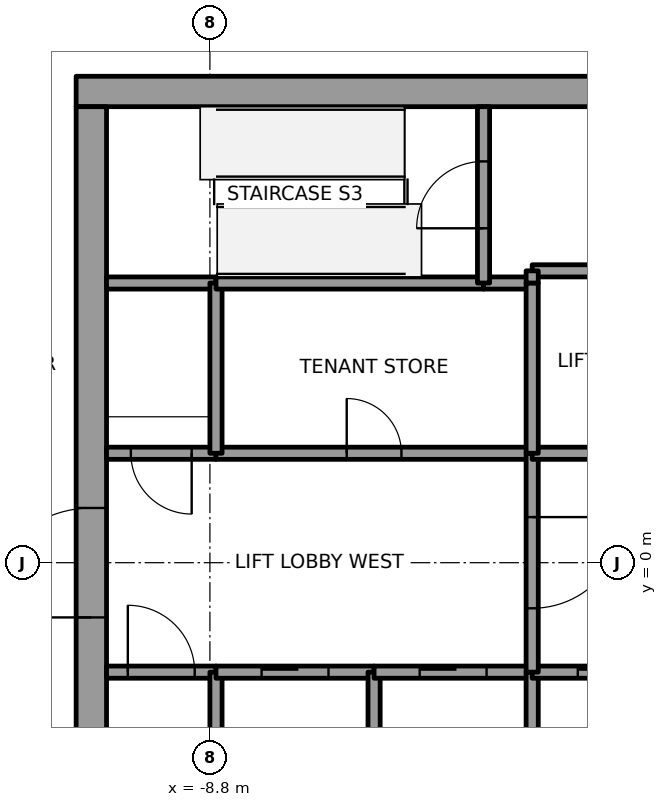
"""IFC4 building model, lengths in metres.
Left out: names, types, materials, properties, quantities, classifications, styles, units other than length and angle.
Written with IfcOpenShell. Run it as: python <this file> out.ifc"""

import sys

from ifc_helpers import new_model, si_unit, direction, frame, frame_2d, origin, place, context, subcontext, project, spatial, rectangle, extrude, element, fill, save


model = new_model("IFC4")
c1 = context("Model", 3, precision=1e-05, world=origin(), true_north=direction((0.0, 1.0)))
c2 = subcontext(c1, "Body", "Model", "MODEL_VIEW")
j1 = project(units=[si_unit("LENGTHUNIT", "METRE"), si_unit("PLANEANGLEUNIT", "RADIAN")], contexts=[c1])
p1 = place(None, origin())
s1 = spatial("IfcSite", under=j1, at=p1, CompositionType="ELEMENT")
p2 = place(p1, origin())
s2 = spatial("IfcBuilding", under=s1, at=p2, CompositionType="ELEMENT")
p3 = place(p2, frame((0.0, 0.0, 267.0)))
s3 = spatial("IfcBuildingStorey", under=s2, at=p3, CompositionType="ELEMENT", Elevation=267.0)
p4 = place(p3, frame((-11.0, 7.75, 0.0), z_axis=(0.0, 0.0, 1.0), x_axis=(1.0, 0.0, 0.0)))
e1 = element("IfcWall", 1, at=p4, inside=s3, PredefinedType="SHEAR", context=c2, shape_type="SweptSolid", body=[
    extrude(rectangle(XDim=22.0, YDim=0.5, at=frame_2d((11.0, 0.0))), origin(), (0.0, 0.0, 1.0), 4.0),
])
p5 = place(p4, frame((10.45, 0.0, 0.0)))
e2 = element("IfcOpeningElement", 2, at=p5, cuts=e1, PredefinedType="OPENING", context=c2, shape_type="SweptSolid", body=[
    extrude(rectangle(XDim=1.1, YDim=2.1, at=frame_2d((0.55, 1.05))), frame((0.0, 0.25, 0.0), z_axis=(0.0, -1.0, 0.0), x_axis=(1.0, 0.0, 0.0)), (0.0, 0.0, 1.0), 0.5),
])
p6 = place(p3, frame((-10.75, -7.5, 0.0), z_axis=(0.0, 0.0, 1.0), x_axis=(0.0, 1.0, 0.0)))
e3 = element("IfcWall", 3, at=p6, inside=s3, PredefinedType="SHEAR", context=c2, shape_type="SweptSolid", body=[
    extrude(rectangle(XDim=15.0, YDim=0.5, at=frame_2d((7.5, 0.0))), origin(), (0.0, 0.0, 1.0), 4.0),
])
p7 = place(p6, frame((6.6, 0.0, 0.0)))
e4 = element("IfcOpeningElement", 4, at=p7, cuts=e3, PredefinedType="OPENING", context=c2, shape_type="SweptSolid", body=[
    extrude(rectangle(XDim=1.8, YDim=2.1, at=frame_2d((0.9, 1.05))), frame((0.0, 0.25, 0.0), z_axis=(0.0, -1.0, 0.0), x_axis=(1.0, 0.0, 0.0)), (0.0, 0.0, 1.0), 0.5),
])
p8 = place(p3, frame((-10.5, -1.8, 0.0), z_axis=(0.0, 0.0, 1.0), x_axis=(1.0, 0.0, 0.0)))
e5 = element("IfcWall", 5, at=p8, inside=s3, PredefinedType="SOLIDWALL", context=c2, shape_type="SweptSolid", body=[
    extrude(rectangle(XDim=1.8, YDim=0.2, at=frame_2d((0.9, 0.0))), origin(), (0.0, 0.0, 1.0), 3.85),
])
p9 = place(p8, frame((0.35, 0.0, 0.0)))
e6 = element("IfcOpeningElement", 6, at=p9, cuts=e5, PredefinedType="OPENING", context=c2, shape_type="SweptSolid", body=[
    extrude(rectangle(XDim=1.1, YDim=2.1, at=frame_2d((0.55, 1.05))), frame((0.0, 0.1, 0.0), z_axis=(0.0, -1.0, 0.0), x_axis=(1.0, 0.0, 0.0)), (0.0, 0.0, 1.0), 0.2),
])
p10 = place(p3, frame((-8.7, 1.8, 0.0), z_axis=(0.0, 0.0, 1.0), x_axis=(-1.0, 0.0, 0.0)))
e7 = element("IfcWall", 7, at=p10, inside=s3, PredefinedType="SOLIDWALL", context=c2, shape_type="SweptSolid", body=[
    extrude(rectangle(XDim=1.8, YDim=0.2, at=frame_2d((0.9, 0.0))), origin(), (0.0, 0.0, 1.0), 3.85),
])
p11 = place(p10, frame((0.4, 0.0, 0.0)))
e8 = element("IfcOpeningElement", 8, at=p11, cuts=e7, PredefinedType="OPENING", context=c2, shape_type="SweptSolid", body=[
    extrude(rectangle(XDim=1.0, YDim=2.1, at=frame_2d((0.5, 1.05))), frame((0.0, 0.1, 0.0), z_axis=(0.0, -1.0, 0.0), x_axis=(1.0, 0.0, 0.0)), (0.0, 0.0, 1.0), 0.2),
])
p12 = place(p3, frame((-8.7, 4.6, 0.0), z_axis=(0.0, 0.0, 1.0), x_axis=(-1.0, 0.0, 0.0)))
e9 = element("IfcWall", 9, at=p12, inside=s3, PredefinedType="SOLIDWALL", context=c2, shape_type="SweptSolid", body=[
    extrude(rectangle(XDim=1.8, YDim=0.2, at=frame_2d((0.9, 0.0))), origin(), (0.0, 0.0, 1.0), 3.85),
])
p13 = place(p3, frame((-8.7, -4.6, 0.0), z_axis=(0.0, 0.0, 1.0), x_axis=(0.0, 1.0, 0.0)))
e10 = element("IfcWall", 10, at=p13, inside=s3, PredefinedType="SOLIDWALL", context=c2, shape_type="SweptSolid", body=[
    extrude(rectangle(XDim=2.8, YDim=0.2, at=frame_2d((1.4, 0.0))), origin(), (0.0, 0.0, 1.0), 3.85),
])
p14 = place(p3, frame((-8.7, -1.8, 0.0), z_axis=(0.0, 0.0, 1.0), x_axis=(1.0, 0.0, 0.0)))
e11 = element("IfcWall", 11, at=p14, inside=s3, PredefinedType="SOLIDWALL", context=c2, shape_type="SweptSolid", body=[
    extrude(rectangle(XDim=2.6, YDim=0.2, at=frame_2d((1.3, 0.0))), origin(), (0.0, 0.0, 1.0), 3.85),
])
p15 = place(p14, frame((0.75, 0.0, 0.0)))
e12 = element("IfcOpeningElement", 12, at=p15, cuts=e11, PredefinedType="OPENING", context=c2, shape_type="SweptSolid", body=[
    extrude(rectangle(XDim=1.1, YDim=2.1, at=frame_2d((0.55, 1.05))), frame((0.0, 0.1, 0.0), z_axis=(0.0, -1.0, 0.0), x_axis=(1.0, 0.0, 0.0)), (0.0, 0.0, 1.0), 0.2),
])
p16 = place(p3, frame((-8.7, 1.8, 0.0), z_axis=(0.0, 0.0, 1.0), x_axis=(1.0, 0.0, 0.0)))
e13 = element("IfcWall", 13, at=p16, inside=s3, PredefinedType="SOLIDWALL", context=c2, shape_type="SweptSolid", body=[
    extrude(rectangle(XDim=5.2, YDim=0.2, at=frame_2d((2.6, 0.0))), origin(), (0.0, 0.0, 1.0), 3.85),
])
p17 = place(p16, frame((2.15, 0.0, 0.0)))
e14 = element("IfcOpeningElement", 14, at=p17, cuts=e13, PredefinedType="OPENING", context=c2, shape_type="SweptSolid", body=[
    extrude(rectangle(XDim=0.9, YDim=2.1, at=frame_2d((0.45, 1.05))), frame((0.0, 0.1, 0.0), z_axis=(0.0, -1.0, 0.0), x_axis=(1.0, 0.0, 0.0)), (0.0, 0.0, 1.0), 0.2),
])
p18 = place(p3, frame((-8.7, 4.6, 0.0), z_axis=(0.0, 0.0, 1.0), x_axis=(0.0, -1.0, 0.0)))
e15 = element("IfcWall", 15, at=p18, inside=s3, PredefinedType="SOLIDWALL", context=c2, shape_type="SweptSolid", body=[
    extrude(rectangle(XDim=2.8, YDim=0.2, at=frame_2d((1.4, 0.0))), origin(), (0.0, 0.0, 1.0), 3.85),
])
p19 = place(p3, frame((-4.3, 4.6, 0.0), z_axis=(0.0, 0.0, 1.0), x_axis=(-1.0, 0.0, 0.0)))
e16 = element("IfcWall", 16, at=p19, inside=s3, PredefinedType="SOLIDWALL", context=c2, shape_type="SweptSolid", body=[
    extrude(rectangle(XDim=4.4, YDim=0.2, at=frame_2d((2.2, 0.0))), origin(), (0.0, 0.0, 1.0), 3.85),
])
p20 = place(p3, frame((-6.1, -4.6, 0.0), z_axis=(0.0, 0.0, 1.0), x_axis=(0.0, 1.0, 0.0)))
e17 = element("IfcWall", 17, at=p20, inside=s3, PredefinedType="SOLIDWALL", context=c2, shape_type="SweptSolid", body=[
    extrude(rectangle(XDim=2.8, YDim=0.2, at=frame_2d((1.4, 0.0))), origin(), (0.0, 0.0, 1.0), 3.85),
])
p21 = place(p3, frame((-6.1, -1.8, 0.0), z_axis=(0.0, 0.0, 1.0), x_axis=(1.0, 0.0, 0.0)))
e18 = element("IfcWall", 18, at=p21, inside=s3, PredefinedType="SOLIDWALL", context=c2, shape_type="SweptSolid", body=[
    extrude(rectangle(XDim=2.6, YDim=0.2, at=frame_2d((1.3, 0.0))), origin(), (0.0, 0.0, 1.0), 3.85),
])
p22 = place(p21, frame((0.75, 0.0, 0.0)))
e19 = element("IfcOpeningElement", 19, at=p22, cuts=e18, PredefinedType="OPENING", context=c2, shape_type="SweptSolid", body=[
    extrude(rectangle(XDim=1.1, YDim=2.1, at=frame_2d((0.55, 1.05))), frame((0.0, 0.1, 0.0), z_axis=(0.0, -1.0, 0.0), x_axis=(1.0, 0.0, 0.0)), (0.0, 0.0, 1.0), 0.2),
])
p23 = place(p3, frame((-3.5, 4.6, 0.0), z_axis=(0.0, 0.0, 1.0), x_axis=(-1.0, 0.0, 0.0)))
e20 = element("IfcWall", 20, at=p23, inside=s3, PredefinedType="SOLIDWALL", context=c2, shape_type="SweptSolid", body=[
    extrude(rectangle(XDim=0.8, YDim=0.2, at=frame_2d((0.4, 0.0))), origin(), (0.0, 0.0, 1.0), 3.85),
])
p24 = place(p3, frame((-4.3, 4.6, 0.0), z_axis=(0.0, 0.0, 1.0), x_axis=(0.0, 1.0, 0.0)))
e21 = element("IfcWall", 21, at=p24, inside=s3, PredefinedType="SOLIDWALL", context=c2, shape_type="SweptSolid", body=[
    extrude(rectangle(XDim=2.9, YDim=0.2, at=frame_2d((1.45, 0.0))), origin(), (0.0, 0.0, 1.0), 3.85),
])
p25 = place(p24, frame((0.9, 0.0, 0.0)))
e22 = element("IfcOpeningElement", 22, at=p25, cuts=e21, PredefinedType="OPENING", context=c2, shape_type="SweptSolid", body=[
    extrude(rectangle(XDim=1.1, YDim=2.1, at=frame_2d((0.55, 1.05))), frame((0.0, 0.1, 0.0), z_axis=(0.0, -1.0, 0.0), x_axis=(1.0, 0.0, 0.0)), (0.0, 0.0, 1.0), 0.2),
])
p26 = place(p3, frame((-3.5, -4.6, 0.0), z_axis=(0.0, 0.0, 1.0), x_axis=(0.0, 1.0, 0.0)))
e23 = element("IfcWall", 23, at=p26, inside=s3, PredefinedType="SOLIDWALL", context=c2, shape_type="SweptSolid", body=[
    extrude(rectangle(XDim=2.8, YDim=0.2, at=frame_2d((1.4, 0.0))), origin(), (0.0, 0.0, 1.0), 3.85),
])
p27 = place(p3, frame((-3.5, -1.8, 0.0), z_axis=(0.0, 0.0, 1.0), x_axis=(1.0, 0.0, 0.0)))
e24 = element("IfcWall", 24, at=p27, inside=s3, PredefinedType="SOLIDWALL", context=c2, shape_type="SweptSolid", body=[
    extrude(rectangle(XDim=2.6, YDim=0.2, at=frame_2d((1.3, 0.0))), origin(), (0.0, 0.0, 1.0), 3.85),
])
p28 = place(p27, frame((0.75, 0.0, 0.0)))
e25 = element("IfcOpeningElement", 25, at=p28, cuts=e24, PredefinedType="OPENING", context=c2, shape_type="SweptSolid", body=[
    extrude(rectangle(XDim=1.1, YDim=2.1, at=frame_2d((0.55, 1.05))), frame((0.0, 0.1, 0.0), z_axis=(0.0, -1.0, 0.0), x_axis=(1.0, 0.0, 0.0)), (0.0, 0.0, 1.0), 0.2),
])
p29 = place(p3, frame((-3.5, 1.8, 0.0), z_axis=(0.0, 0.0, 1.0), x_axis=(0.0, -1.0, 0.0)))
e26 = element("IfcWall", 26, at=p29, inside=s3, PredefinedType="SOLIDWALL", context=c2, shape_type="SweptSolid", body=[
    extrude(rectangle(XDim=3.6, YDim=0.2, at=frame_2d((1.8, 0.0))), origin(), (0.0, 0.0, 1.0), 3.85),
])
p30 = place(p29, frame((1.05, 0.0, 0.0)))
e27 = element("IfcOpeningElement", 27, at=p30, cuts=e26, PredefinedType="OPENING", context=c2, shape_type="SweptSolid", body=[
    extrude(rectangle(XDim=1.5, YDim=2.1, at=frame_2d((0.75, 1.05))), frame((0.0, 0.1, 0.0), z_axis=(0.0, -1.0, 0.0), x_axis=(1.0, 0.0, 0.0)), (0.0, 0.0, 1.0), 0.2),
])
p31 = place(p3, frame((-0.9, 1.8, 0.0), z_axis=(0.0, 0.0, 1.0), x_axis=(-1.0, 0.0, 0.0)))
e28 = element("IfcWall", 28, at=p31, inside=s3, PredefinedType="SOLIDWALL", context=c2, shape_type="SweptSolid", body=[
    extrude(rectangle(XDim=2.6, YDim=0.2, at=frame_2d((1.3, 0.0))), origin(), (0.0, 0.0, 1.0), 3.85),
])
p32 = place(p3, frame((-3.5, 1.8, 0.0), z_axis=(0.0, 0.0, 1.0), x_axis=(0.0, 1.0, 0.0)))
e29 = element("IfcWall", 29, at=p32, inside=s3, PredefinedType="SOLIDWALL", context=c2, shape_type="SweptSolid", body=[
    extrude(rectangle(XDim=2.8, YDim=0.2, at=frame_2d((1.4, 0.0))), origin(), (0.0, 0.0, 1.0), 3.85),
])
p33 = place(p3, frame((-0.9, 4.8, 0.0), z_axis=(0.0, 0.0, 1.0), x_axis=(-1.0, 0.0, 0.0)))
e30 = element("IfcWall", 30, at=p33, inside=s3, PredefinedType="SOLIDWALL", context=c2, shape_type="SweptSolid", body=[
    extrude(rectangle(XDim=2.6, YDim=0.2, at=frame_2d((1.3, 0.0))), origin(), (0.0, 0.0, 1.0), 3.85),
])
p34 = place(p3, frame((-3.5, 4.8, 0.0), z_axis=(0.0, 0.0, 1.0), x_axis=(0.0, -1.0, 0.0)))
e31 = element("IfcWall", 31, at=p34, inside=s3, PredefinedType="SOLIDWALL", context=c2, shape_type="SweptSolid", body=[
    extrude(rectangle(XDim=0.2, YDim=0.2, at=frame_2d((0.1, 0.0))), origin(), (0.0, 0.0, 1.0), 3.85),
])
p35 = place(p15, origin())
e32 = element("IfcDoor", 32, at=p35, inside=s3, OperationType="SLIDING_TO_LEFT", PredefinedType="DOOR", context=c2, shape_type="SweptSolid", body=[
    extrude(rectangle(XDim=1.1, YDim=2.1, at=frame_2d((0.55, 1.05))), frame((0.0, 0.025, 0.0), z_axis=(0.0, -1.0, 0.0), x_axis=(1.0, 0.0, 0.0)), (0.0, 0.0, 1.0), 0.05),
])
fill(e12, e32)
p36 = place(p22, origin())
e33 = element("IfcDoor", 33, at=p36, inside=s3, OperationType="SLIDING_TO_LEFT", PredefinedType="DOOR", context=c2, shape_type="SweptSolid", body=[
    extrude(rectangle(XDim=1.1, YDim=2.1, at=frame_2d((0.55, 1.05))), frame((0.0, 0.025, 0.0), z_axis=(0.0, -1.0, 0.0), x_axis=(1.0, 0.0, 0.0)), (0.0, 0.0, 1.0), 0.05),
])
fill(e19, e33)
p37 = place(p28, origin())
e34 = element("IfcDoor", 34, at=p37, inside=s3, OperationType="SLIDING_TO_LEFT", PredefinedType="DOOR", context=c2, shape_type="SweptSolid", body=[
    extrude(rectangle(XDim=1.1, YDim=2.1, at=frame_2d((0.55, 1.05))), frame((0.0, 0.025, 0.0), z_axis=(0.0, -1.0, 0.0), x_axis=(1.0, 0.0, 0.0)), (0.0, 0.0, 1.0), 0.05),
])
fill(e25, e34)
p38 = place(p30, origin())
e35 = element("IfcDoor", 35, at=p38, inside=s3, OperationType="DOUBLE_DOOR_SINGLE_SWING", PredefinedType="DOOR", context=c2, shape_type="SweptSolid", body=[
    extrude(rectangle(XDim=1.5, YDim=2.1, at=frame_2d((0.75, 1.05))), frame((0.0, 0.025, 0.0), z_axis=(0.0, -1.0, 0.0), x_axis=(1.0, 0.0, 0.0)), (0.0, 0.0, 1.0), 0.05),
])
fill(e27, e35)
p39 = place(p9, origin())
e36 = element("IfcDoor", 36, at=p39, inside=s3, OperationType="SINGLE_SWING_RIGHT", PredefinedType="DOOR", context=c2, shape_type="SweptSolid", body=[
    extrude(rectangle(XDim=1.1, YDim=2.1, at=frame_2d((0.55, 1.05))), frame((0.0, 0.025, 0.0), z_axis=(0.0, -1.0, 0.0), x_axis=(1.0, 0.0, 0.0)), (0.0, 0.0, 1.0), 0.05),
])
fill(e6, e36)
p40 = place(p11, origin())
e37 = element("IfcDoor", 37, at=p40, inside=s3, OperationType="SINGLE_SWING_RIGHT", PredefinedType="DOOR", context=c2, shape_type="SweptSolid", body=[
    extrude(rectangle(XDim=1.0, YDim=2.1, at=frame_2d((0.5, 1.05))), frame((0.0, 0.025, 0.0), z_axis=(0.0, -1.0, 0.0), x_axis=(1.0, 0.0, 0.0)), (0.0, 0.0, 1.0), 0.05),
])
fill(e8, e37)
p41 = place(p25, origin())
e38 = element("IfcDoor", 38, at=p41, inside=s3, OperationType="SINGLE_SWING_RIGHT", PredefinedType="DOOR", context=c2, shape_type="SweptSolid", body=[
    extrude(rectangle(XDim=1.1, YDim=2.1, at=frame_2d((0.55, 1.05))), frame((0.0, 0.025, 0.0), z_axis=(0.0, -1.0, 0.0), x_axis=(1.0, 0.0, 0.0)), (0.0, 0.0, 1.0), 0.05),
])
fill(e22, e38)
p42 = place(p17, origin())
e39 = element("IfcDoor", 39, at=p42, inside=s3, OperationType="SINGLE_SWING_LEFT", PredefinedType="DOOR", context=c2, shape_type="SweptSolid", body=[
    extrude(rectangle(XDim=0.9, YDim=2.1, at=frame_2d((0.45, 1.05))), frame((0.0, 0.025, 0.0), z_axis=(0.0, -1.0, 0.0), x_axis=(1.0, 0.0, 0.0)), (0.0, 0.0, 1.0), 0.05),
])
fill(e14, e39)
p43 = place(p7, origin())
e40 = element("IfcDoor", 40, at=p43, inside=s3, OperationType="DOUBLE_DOOR_SINGLE_SWING", PredefinedType="DOOR", context=c2, shape_type="SweptSolid", body=[
    extrude(rectangle(XDim=1.8, YDim=2.1, at=frame_2d((0.9, 1.05))), frame((0.0, 0.025, 0.0), z_axis=(0.0, -1.0, 0.0), x_axis=(1.0, 0.0, 0.0)), (0.0, 0.0, 1.0), 0.05),
])
fill(e4, e40)
save(model, sys.argv[1])
